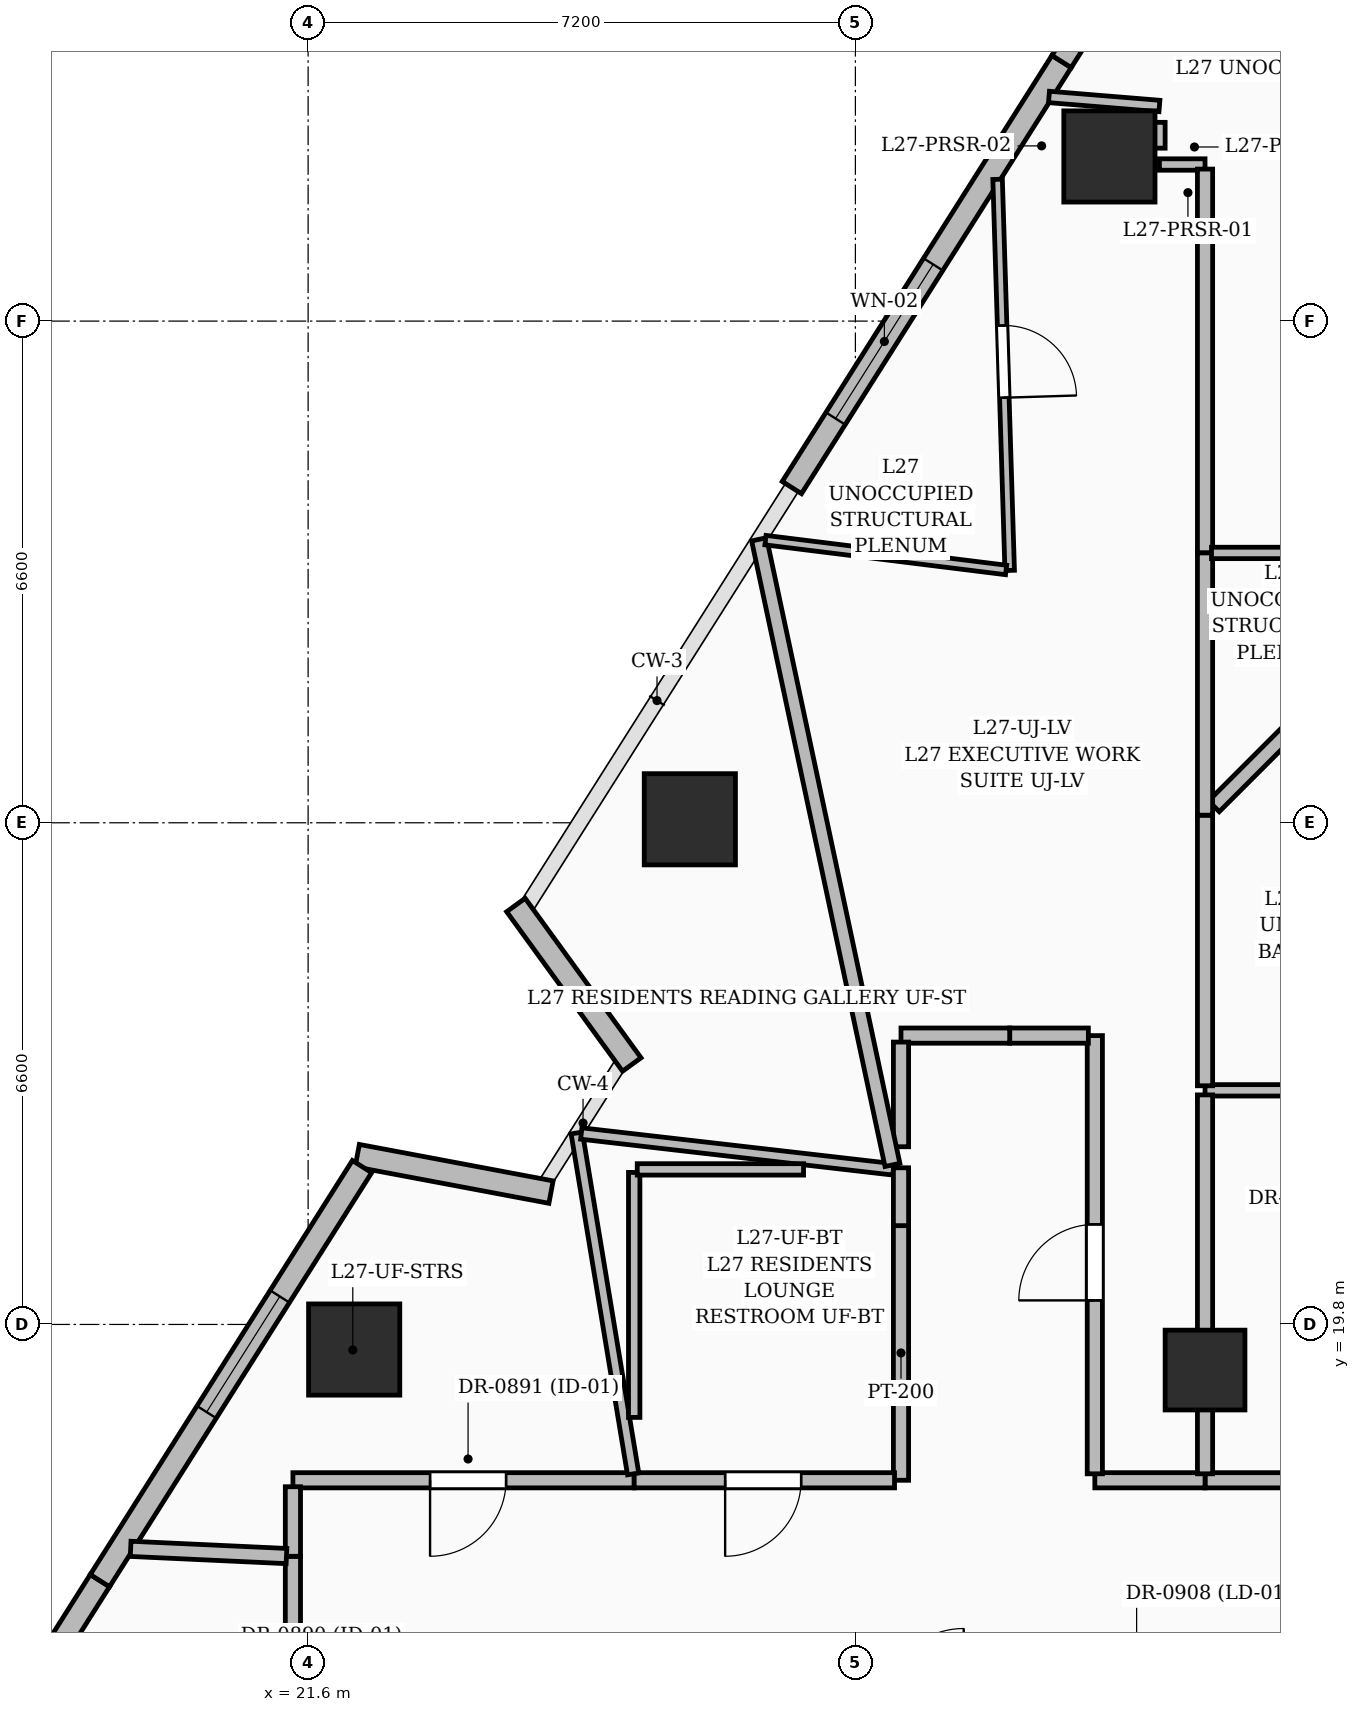
"""IFC4 building model, lengths in metres.
Left out: names, types, materials, properties, quantities, classifications, styles, units other than length and angle.
Written with IfcOpenShell. Run it as: python <this file> out.ifc"""

import sys

from ifc_helpers import new_model, si_unit, direction, frame, frame_2d, origin, origin_2d, place, context, subcontext, project, spatial, rectangle, extrude, element, fill, save


model = new_model("IFC4")
c1 = context("Model", 3, precision=1e-05, world=origin(), true_north=direction((0.0, 1.0)))
c2 = subcontext(c1, "Body", "Model", "MODEL_VIEW")
j1 = project(units=[si_unit("LENGTHUNIT", "METRE"), si_unit("PLANEANGLEUNIT", "RADIAN")], contexts=[c1])
p1 = place(None, origin())
s1 = spatial("IfcSite", under=j1, at=p1, CompositionType="ELEMENT")
p2 = place(p1, origin())
s2 = spatial("IfcBuilding", under=s1, at=p2, CompositionType="ELEMENT")
p3 = place(p2, frame((0.0, 0.0, 110.4)))
s3 = spatial("IfcBuildingStorey", under=s2, at=p3, CompositionType="ELEMENT", Elevation=110.4)
p4 = place(p3, frame((33.4, 19.2, 0.0), z_axis=(0.0, 0.0, 1.0), x_axis=(1.0, 0.0, 0.0)))
e1 = element("IfcColumn", 1, at=p4, inside=s3, PredefinedType="COLUMN", context=c2, shape_type="SweptSolid", body=[
    extrude(rectangle(XDim=1.05, YDim=1.05, at=origin_2d()), origin(), (0.0, 0.0, 1.0), 3.6),
])
for number, where, z_axis, x_axis in (
    (2, (32.142, 35.166, 0.0), (0.0, 0.0, 1.0), (1.0, 0.0, 0.0)),
    (3, (26.622, 26.446, 0.0), (0.0, 0.0, 1.0), (1.0, 0.0, 0.0)),
    (4, (22.206, 19.47, 0.0), (0.0, 0.0, 1.0), (1.0, 0.0, 0.0)),
):
    element("IfcColumn", number, at=place(p3, frame(where, z_axis=z_axis, x_axis=x_axis)), inside=s3, PredefinedType="COLUMN", context=c2, shape_type="SweptSolid", body=[
        extrude(rectangle(XDim=1.2, YDim=1.2, at=origin_2d()), origin(), (0.0, 0.0, 1.0), 3.6),
    ])
for number, where, z_axis, x_axis in (
    (5, (22.246, 22.021, 0.0), (0.0, 0.0, 1.0), (0.983, -0.185, 0.0)),
    (6, (25.858, 23.22, 0.0), (0.0, 0.0, 1.0), (-0.588, 0.809, 0.0)),
):
    element("IfcWall", number, at=place(p3, frame(where, z_axis=z_axis, x_axis=x_axis)), inside=s3, PredefinedType="SOLIDWALL", context=c2, shape_type="SweptSolid", body=[
        extrude(rectangle(XDim=2.594, YDim=0.3, at=frame_2d((1.297, 0.0))), origin(), (0.0, 0.0, 1.0), 2.575),
    ])
p5 = place(p3, frame((27.964, 30.81, 0.0), z_axis=(0.0, 0.0, 1.0), x_axis=(0.534892719091, 0.844919983823, 0.0)))
e7 = element("IfcWall", 7, at=p5, inside=s3, PredefinedType="SOLIDWALL", context=c2, shape_type="SweptSolid", body=[
    extrude(rectangle(XDim=6.634, YDim=0.3, at=frame_2d((3.317, 0.0))), origin(), (0.0, 0.0, 1.0), 3.35),
])
p6 = place(p5, frame((1.075, 0.0, 0.6)))
e8 = element("IfcOpeningElement", 8, at=p6, cuts=e7, PredefinedType="OPENING", context=c2, shape_type="SweptSolid", body=[
    extrude(rectangle(XDim=2.4, YDim=2.1, at=frame_2d((1.2, 1.05))), frame((0.0, 0.16, 0.0), z_axis=(0.0, -1.0, 0.0), x_axis=(1.0, 0.0, 0.0)), (0.0, 0.0, 1.0), 0.32),
])
p7 = place(p3, frame((31.513, 36.415, 0.0), z_axis=(0.0, 0.0, 1.0), x_axis=(0.534892719091, 0.844919983823, 0.0)))
e9 = element("IfcWall", 9, at=p7, inside=s3, PredefinedType="SOLIDWALL", context=c2, shape_type="SweptSolid", body=[
    extrude(rectangle(XDim=6.634, YDim=0.3, at=frame_2d((3.317, 0.0))), origin(), (0.0, 0.0, 1.0), 3.35),
])
p8 = place(p7, frame((0.6, 0.0, 0.55)))
e10 = element("IfcOpeningElement", 10, at=p8, cuts=e9, PredefinedType="OPENING", context=c2, shape_type="SweptSolid", body=[
    extrude(rectangle(XDim=1.6, YDim=2.2, at=frame_2d((0.8, 1.1))), frame((0.0, 0.16, 0.0), z_axis=(0.0, -1.0, 0.0), x_axis=(1.0, 0.0, 0.0)), (0.0, 0.0, 1.0), 0.32),
])
p9 = place(p7, frame((3.35, 0.0, 0.55)))
e11 = element("IfcOpeningElement", 11, at=p9, cuts=e9, PredefinedType="OPENING", context=c2, shape_type="SweptSolid", body=[
    extrude(rectangle(XDim=1.6, YDim=2.2, at=frame_2d((0.8, 1.1))), frame((0.0, 0.16, 0.0), z_axis=(0.0, -1.0, 0.0), x_axis=(1.0, 0.0, 0.0)), (0.0, 0.0, 1.0), 0.32),
])
p10 = place(p3, frame((15.262, 10.746, 0.0), z_axis=(0.0, 0.0, 1.0), x_axis=(0.534880248718, 0.844927878302, 0.0)))
e12 = element("IfcWall", 12, at=p10, inside=s3, PredefinedType="SOLIDWALL", context=c2, shape_type="SweptSolid", body=[
    extrude(rectangle(XDim=6.727, YDim=0.3, at=frame_2d((3.364, 0.0))), origin(), (0.0, 0.0, 1.0), 3.35),
])
p11 = place(p10, frame((0.725, 0.0, 0.55)))
e13 = element("IfcOpeningElement", 13, at=p11, cuts=e12, PredefinedType="OPENING", context=c2, shape_type="SweptSolid", body=[
    extrude(rectangle(XDim=2.1, YDim=2.4, at=frame_2d((1.05, 1.2))), frame((0.0, 0.16, 0.0), z_axis=(0.0, -1.0, 0.0), x_axis=(1.0, 0.0, 0.0)), (0.0, 0.0, 1.0), 0.32),
])
p12 = place(p3, frame((18.861, 16.429, 0.0), z_axis=(0.0, 0.0, 1.0), x_axis=(0.534891708764, 0.844920623429, 0.0)))
e14 = element("IfcWall", 14, at=p12, inside=s3, PredefinedType="SOLIDWALL", context=c2, shape_type="SweptSolid", body=[
    extrude(rectangle(XDim=6.447, YDim=0.3, at=frame_2d((3.224, 0.0))), origin(), (0.0, 0.0, 1.0), 3.35),
])
p13 = place(p12, frame((2.625, 0.0, 0.6)))
e15 = element("IfcOpeningElement", 15, at=p13, cuts=e14, PredefinedType="OPENING", context=c2, shape_type="SweptSolid", body=[
    extrude(rectangle(XDim=1.8, YDim=2.1, at=frame_2d((0.9, 1.05))), frame((0.0, 0.16, 0.0), z_axis=(0.0, -1.0, 0.0), x_axis=(1.0, 0.0, 0.0)), (0.0, 0.0, 1.0), 0.32),
])
p14 = place(p3, frame((21.4, 16.75, 0.0), z_axis=(0.0, 0.0, 1.0), x_axis=(0.0, -1.0, 0.0)))
e16 = element("IfcWall", 16, at=p14, inside=s3, PredefinedType="PARTITIONING", context=c2, shape_type="SweptSolid", body=[
    extrude(rectangle(XDim=4.5, YDim=0.2, at=frame_2d((2.25, 0.0))), origin(), (0.0, 0.0, 1.0), 2.709),
])
p15 = place(p14, frame((1.69, 0.0, 0.0)))
e17 = element("IfcOpeningElement", 17, at=p15, cuts=e16, PredefinedType="OPENING", context=c2, shape_type="SweptSolid", body=[
    extrude(rectangle(XDim=1.0, YDim=2.2, at=frame_2d((0.5, 1.1))), frame((0.0, 0.11, 0.0), z_axis=(0.0, -1.0, 0.0), x_axis=(1.0, 0.0, 0.0)), (0.0, 0.0, 1.0), 0.22),
])
p16 = place(p3, frame((25.89, 17.75, 0.0), z_axis=(0.0, 0.0, 1.0), x_axis=(-1.0, 0.0, 0.0)))
e18 = element("IfcWall", 18, at=p16, inside=s3, PredefinedType="PARTITIONING", context=c2, shape_type="SweptSolid", body=[
    extrude(rectangle(XDim=4.49, YDim=0.2, at=frame_2d((2.245, 0.0))), origin(), (0.0, 0.0, 1.0), 2.372),
])
p17 = place(p16, frame((1.686, 0.0, 0.0)))
e19 = element("IfcOpeningElement", 19, at=p17, cuts=e18, PredefinedType="OPENING", context=c2, shape_type="SweptSolid", body=[
    extrude(rectangle(XDim=1.0, YDim=2.2, at=frame_2d((0.5, 1.1))), frame((0.0, 0.11, 0.0), z_axis=(0.0, -1.0, 0.0), x_axis=(1.0, 0.0, 0.0)), (0.0, 0.0, 1.0), 0.22),
])
p18 = place(p3, frame((21.4, 17.665, 0.0), z_axis=(0.0, 0.0, 1.0), x_axis=(0.0, -1.0, 0.0)))
e20 = element("IfcWall", 20, at=p18, inside=s3, PredefinedType="PARTITIONING", context=c2, shape_type="SweptSolid", body=[
    extrude(rectangle(XDim=0.915, YDim=0.2, at=frame_2d((0.458, 0.0))), origin(), (0.0, 0.0, 1.0), 2.57),
])
p19 = place(p3, frame((29.4, 21.1, 0.0), z_axis=(0.0, 0.0, 1.0), x_axis=(0.0, -1.0, 0.0)))
e21 = element("IfcWall", 21, at=p19, inside=s3, PredefinedType="PARTITIONING", context=c2, shape_type="SweptSolid", body=[
    extrude(rectangle(XDim=3.35, YDim=0.2, at=frame_2d((1.675, 0.0))), origin(), (0.0, 0.0, 1.0), 2.709),
])
p20 = place(p3, frame((29.315, 17.75, 0.0), z_axis=(0.0, 0.0, 1.0), x_axis=(-1.0, 0.0, 0.0)))
e22 = element("IfcWall", 22, at=p20, inside=s3, PredefinedType="PARTITIONING", context=c2, shape_type="SweptSolid", body=[
    extrude(rectangle(XDim=3.425, YDim=0.2, at=frame_2d((1.712, 0.0))), origin(), (0.0, 0.0, 1.0), 2.709),
])
p21 = place(p20, frame((1.229, 0.0, 0.0)))
e23 = element("IfcOpeningElement", 23, at=p21, cuts=e22, PredefinedType="OPENING", context=c2, shape_type="SweptSolid", body=[
    extrude(rectangle(XDim=1.0, YDim=2.2, at=frame_2d((0.5, 1.1))), frame((0.0, 0.11, 0.0), z_axis=(0.0, -1.0, 0.0), x_axis=(1.0, 0.0, 0.0)), (0.0, 0.0, 1.0), 0.22),
])
p22 = place(p3, frame((36.4, 17.75, 0.0), z_axis=(0.0, 0.0, 1.0), x_axis=(-1.0, 0.0, 0.0)))
e24 = element("IfcWall", 24, at=p22, inside=s3, PredefinedType="PARTITIONING", context=c2, shape_type="SweptSolid", body=[
    extrude(rectangle(XDim=3.0, YDim=0.2, at=frame_2d((1.5, 0.0))), origin(), (0.0, 0.0, 1.0), 2.436),
])
p23 = place(p3, frame((33.4, 17.75, 0.0), z_axis=(0.0, 0.0, 1.0), x_axis=(-1.0, 0.0, 0.0)))
e25 = element("IfcWall", 25, at=p23, inside=s3, PredefinedType="PARTITIONING", context=c2, shape_type="SweptSolid", body=[
    extrude(rectangle(XDim=1.45, YDim=0.2, at=frame_2d((0.725, 0.0))), origin(), (0.0, 0.0, 1.0), 3.35),
])
p24 = place(p3, frame((31.95, 17.835, 0.0), z_axis=(0.0, 0.0, 1.0), x_axis=(0.0, 1.0, 0.0)))
e26 = element("IfcWall", 26, at=p24, inside=s3, PredefinedType="PARTITIONING", context=c2, shape_type="SweptSolid", body=[
    extrude(rectangle(XDim=5.765, YDim=0.2, at=frame_2d((2.883, 0.0))), origin(), (0.0, 0.0, 1.0), 2.372),
])
p25 = place(p24, frame((2.281, 0.0, 0.0)))
e27 = element("IfcOpeningElement", 27, at=p25, cuts=e26, PredefinedType="OPENING", context=c2, shape_type="SweptSolid", body=[
    extrude(rectangle(XDim=1.0, YDim=2.2, at=frame_2d((0.5, 1.1))), frame((0.0, 0.11, 0.0), z_axis=(0.0, -1.0, 0.0), x_axis=(1.0, 0.0, 0.0)), (0.0, 0.0, 1.0), 0.22),
])
p26 = place(p3, frame((31.865, 23.6, 0.0), z_axis=(0.0, 0.0, 1.0), x_axis=(-1.0, 0.0, 0.0)))
e28 = element("IfcWall", 28, at=p26, inside=s3, PredefinedType="PARTITIONING", context=c2, shape_type="SweptSolid", body=[
    extrude(rectangle(XDim=1.035, YDim=0.2, at=frame_2d((0.518, 0.0))), origin(), (0.0, 0.0, 1.0), 2.709),
])
p27 = place(p3, frame((30.83, 23.6, 0.0), z_axis=(0.0, 0.0, 1.0), x_axis=(-1.0, 0.0, 0.0)))
e29 = element("IfcWall", 29, at=p27, inside=s3, PredefinedType="PARTITIONING", context=c2, shape_type="SweptSolid", body=[
    extrude(rectangle(XDim=1.43, YDim=0.2, at=frame_2d((0.715, 0.0))), origin(), (0.0, 0.0, 1.0), 2.372),
])
p28 = place(p3, frame((29.4, 23.515, 0.0), z_axis=(0.0, 0.0, 1.0), x_axis=(0.0, -1.0, 0.0)))
e30 = element("IfcWall", 30, at=p28, inside=s3, PredefinedType="PARTITIONING", context=c2, shape_type="SweptSolid", body=[
    extrude(rectangle(XDim=1.377, YDim=0.2, at=frame_2d((0.688, 0.0))), origin(), (0.0, 0.0, 1.0), 2.372),
])
p29 = place(p3, frame((21.315, 16.753, 0.0), z_axis=(0.0, 0.0, 1.0), x_axis=(-0.998928926466, 0.046270939795, 0.0)))
e31 = element("IfcWall", 31, at=p29, inside=s3, PredefinedType="PARTITIONING", context=c2, shape_type="SweptSolid", body=[
    extrude(rectangle(XDim=2.052, YDim=0.2, at=frame_2d((1.026, 0.0))), origin(), (0.0, 0.0, 1.0), 2.57),
])
p30 = place(p3, frame((25.876, 17.834, 0.0), z_axis=(0.0, 0.0, 1.0), x_axis=(-0.163258044995, 0.986583402832, 0.0)))
e32 = element("IfcWall", 32, at=p30, inside=s3, PredefinedType="PARTITIONING", context=c2, shape_type="SweptSolid", body=[
    extrude(rectangle(XDim=4.546, YDim=0.15, at=frame_2d((2.273, 0.0))), origin(), (0.0, 0.0, 1.0), 2.709),
])
p31 = place(p3, frame((29.3, 21.84, 0.0), z_axis=(0.0, 0.0, 1.0), x_axis=(-0.993461085134, 0.114171241234, 0.0)))
e33 = element("IfcWall", 33, at=p31, inside=s3, PredefinedType="PARTITIONING", context=c2, shape_type="SweptSolid", body=[
    extrude(rectangle(XDim=4.134, YDim=0.15, at=frame_2d((2.067, 0.0))), origin(), (0.0, 0.0, 1.0), 2.709),
])
p32 = place(p3, frame((29.288, 21.899, 0.0), z_axis=(0.0, 0.0, 1.0), x_axis=(-0.208508604507, 0.978020532426, 0.0)))
e34 = element("IfcWall", 34, at=p32, inside=s3, PredefinedType="PARTITIONING", context=c2, shape_type="SweptSolid", body=[
    extrude(rectangle(XDim=8.415, YDim=0.2, at=frame_2d((4.208, 0.0))), origin(), (0.0, 0.0, 1.0), 2.372),
])
p33 = place(p3, frame((33.4, 22.88, 0.0), z_axis=(0.0, 0.0, 1.0), x_axis=(1.0, 0.0, 0.0)))
e35 = element("IfcWall", 35, at=p33, inside=s3, PredefinedType="PARTITIONING", context=c2, shape_type="SweptSolid", body=[
    extrude(rectangle(XDim=2.94, YDim=0.15, at=frame_2d((1.47, 0.0))), origin(), (0.0, 0.0, 1.0), 2.436),
])
p34 = place(p33, frame((1.075, 0.0, 0.0)))
e36 = element("IfcOpeningElement", 36, at=p34, cuts=e35, PredefinedType="OPENING", context=c2, shape_type="SweptSolid", body=[
    extrude(rectangle(XDim=0.85, YDim=2.1, at=frame_2d((0.425, 1.05))), frame((0.0, 0.085, 0.0), z_axis=(0.0, -1.0, 0.0), x_axis=(1.0, 0.0, 0.0)), (0.0, 0.0, 1.0), 0.17),
])
p35 = place(p3, frame((33.4, 26.5, 0.0), z_axis=(0.0, 0.0, 1.0), x_axis=(0.0, -1.0, 0.0)))
e37 = element("IfcWall", 37, at=p35, inside=s3, PredefinedType="PARTITIONING", context=c2, shape_type="SweptSolid", body=[
    extrude(rectangle(XDim=3.56, YDim=0.2, at=frame_2d((1.78, 0.0))), origin(), (0.0, 0.0, 1.0), 2.709),
])
p36 = place(p3, frame((36.358, 29.458, 0.0), z_axis=(0.0, 0.0, 1.0), x_axis=(-0.707137163672, -0.707076397395, 0.0)))
e38 = element("IfcWall", 38, at=p36, inside=s3, PredefinedType="PARTITIONING", context=c2, shape_type="SweptSolid", body=[
    extrude(rectangle(XDim=4.018, YDim=0.2, at=frame_2d((2.009, 0.0))), origin(), (0.0, 0.0, 1.0), 2.372),
])
p37 = place(p3, frame((33.4, 22.82, 0.0), z_axis=(0.0, 0.0, 1.0), x_axis=(0.0, -1.0, 0.0)))
e39 = element("IfcWall", 39, at=p37, inside=s3, PredefinedType="PARTITIONING", context=c2, shape_type="SweptSolid", body=[
    extrude(rectangle(XDim=4.985, YDim=0.2, at=frame_2d((2.493, 0.0))), origin(), (0.0, 0.0, 1.0), 2.436),
])
p38 = place(p3, frame((33.4, 35.06, 0.0), z_axis=(0.0, 0.0, 1.0), x_axis=(-1.0, 0.0, 0.0)))
e40 = element("IfcWall", 40, at=p38, inside=s3, PredefinedType="PARTITIONING", context=c2, shape_type="SweptSolid", body=[
    extrude(rectangle(XDim=0.6, YDim=0.15, at=frame_2d((0.3, 0.0))), origin(), (0.0, 0.0, 1.0), 2.57),
])
p39 = place(p3, frame((30.671, 34.865, 0.0), z_axis=(0.0, 0.0, 1.0), x_axis=(0.030923800782, -0.999521744909, 0.0)))
e41 = element("IfcWall", 41, at=p39, inside=s3, PredefinedType="PARTITIONING", context=c2, shape_type="SweptSolid", body=[
    extrude(rectangle(XDim=5.147, YDim=0.125, at=frame_2d((2.574, 0.0))), origin(), (0.0, 0.0, 1.0), 2.57),
])
p40 = place(p39, frame((1.924, 0.0, 0.0)))
e42 = element("IfcOpeningElement", 42, at=p40, cuts=e41, PredefinedType="OPENING", context=c2, shape_type="SweptSolid", body=[
    extrude(rectangle(XDim=0.95, YDim=2.2, at=frame_2d((0.475, 1.1))), frame((0.0, 0.072, 0.0), z_axis=(0.0, -1.0, 0.0), x_axis=(1.0, 0.0, 0.0)), (0.0, 0.0, 1.0), 0.145),
])
p41 = place(p3, frame((33.4, 29.95, 0.0), z_axis=(0.0, 0.0, 1.0), x_axis=(0.0, 1.0, 0.0)))
e43 = element("IfcWall", 43, at=p41, inside=s3, PredefinedType="PARTITIONING", context=c2, shape_type="SweptSolid", body=[
    extrude(rectangle(XDim=5.05, YDim=0.2, at=frame_2d((2.525, 0.0))), origin(), (0.0, 0.0, 1.0), 2.372),
])
p42 = place(p3, frame((33.4, 26.5, 0.0), z_axis=(0.0, 0.0, 1.0), x_axis=(0.0, 1.0, 0.0)))
e44 = element("IfcWall", 44, at=p42, inside=s3, PredefinedType="PARTITIONING", context=c2, shape_type="SweptSolid", body=[
    extrude(rectangle(XDim=3.45, YDim=0.2, at=frame_2d((1.725, 0.0))), origin(), (0.0, 0.0, 1.0), 2.709),
])
p43 = place(p3, frame((27.617, 30.118, 0.0), z_axis=(0.0, 0.0, 1.0), x_axis=(0.992397517991, -0.123073824536, 0.0)))
e45 = element("IfcWall", 45, at=p43, inside=s3, PredefinedType="PARTITIONING", context=c2, shape_type="SweptSolid", body=[
    extrude(rectangle(XDim=3.19, YDim=0.125, at=frame_2d((1.595, 0.0))), origin(), (0.0, 0.0, 1.0), 2.57),
])
p44 = place(p3, frame((33.485, 29.95, 0.0), z_axis=(0.0, 0.0, 1.0), x_axis=(1.0, 0.0, 0.0)))
e46 = element("IfcWall", 46, at=p44, inside=s3, PredefinedType="PARTITIONING", context=c2, shape_type="SweptSolid", body=[
    extrude(rectangle(XDim=3.28, YDim=0.15, at=frame_2d((1.64, 0.0))), origin(), (0.0, 0.0, 1.0), 2.372),
])
p45 = place(p3, frame((25.89, 18.577, 0.0), z_axis=(0.0, 0.0, 1.0), x_axis=(0.0, 1.0, 0.0)))
e47 = element("IfcWall", 47, at=p45, inside=s3, PredefinedType="PARTITIONING", context=c2, shape_type="SweptSolid", body=[
    extrude(rectangle(XDim=3.223, YDim=0.15, at=frame_2d((1.612, 0.0))), origin(), (0.0, 0.0, 1.0), 2.709),
])
p46 = place(p3, frame((25.93, 21.84, 0.0), z_axis=(0.0, 0.0, 1.0), x_axis=(1.0, 0.0, 0.0)))
e48 = element("IfcWall", 48, at=p46, inside=s3, PredefinedType="PARTITIONING", context=c2, shape_type="SweptSolid", body=[
    extrude(rectangle(XDim=2.188, YDim=0.15, at=frame_2d((1.094, 0.0))), origin(), (0.0, 0.0, 1.0), 2.709),
])
p47 = place(p3, frame((31.347, 35.949, 0.0), z_axis=(0.0, 0.0, 1.0), x_axis=(0.996669356606, -0.081548719198, 0.0)))
e49 = element("IfcWall", 49, at=p47, inside=s3, PredefinedType="PARTITIONING", context=c2, shape_type="SweptSolid", body=[
    extrude(rectangle(XDim=1.458, YDim=0.15, at=frame_2d((0.729, 0.0))), origin(), (0.0, 0.0, 1.0), 3.35),
])
p48 = place(p3, frame((32.8, 35.615, 0.0), z_axis=(0.0, 0.0, 1.0), x_axis=(0.0, -1.0, 0.0)))
e50 = element("IfcWall", 50, at=p48, inside=s3, PredefinedType="PARTITIONING", context=c2, shape_type="SweptSolid", body=[
    extrude(rectangle(XDim=0.34, YDim=0.15, at=frame_2d((0.17, 0.0))), origin(), (0.0, 0.0, 1.0), 2.57),
])
p49 = place(p3, frame((29.4, 21.861, 0.0), z_axis=(0.0, 0.0, 1.0), x_axis=(0.0, -1.0, 0.0)))
e51 = element("IfcWall", 51, at=p49, inside=s3, PredefinedType="PARTITIONING", context=c2, shape_type="SweptSolid", body=[
    extrude(rectangle(XDim=0.761, YDim=0.2, at=frame_2d((0.38, 0.0))), origin(), (0.0, 0.0, 1.0), 2.372),
])
p50 = place(p6, origin())
e52 = element("IfcWindow", 52, at=p50, inside=s3, PartitioningType="SINGLE_PANEL", PredefinedType="WINDOW", context=c2, shape_type="SweptSolid", body=[
    extrude(rectangle(XDim=2.4, YDim=2.1, at=frame_2d((1.2, 1.05))), frame((0.0, 0.03, 0.0), z_axis=(0.0, -1.0, 0.0), x_axis=(1.0, 0.0, 0.0)), (0.0, 0.0, 1.0), 0.06),
])
fill(e8, e52)
p51 = place(p13, origin())
e53 = element("IfcWindow", 53, at=p51, inside=s3, PartitioningType="SINGLE_PANEL", PredefinedType="WINDOW", context=c2, shape_type="SweptSolid", body=[
    extrude(rectangle(XDim=1.8, YDim=2.1, at=frame_2d((0.9, 1.05))), frame((0.0, 0.03, 0.0), z_axis=(0.0, -1.0, 0.0), x_axis=(1.0, 0.0, 0.0)), (0.0, 0.0, 1.0), 0.06),
])
fill(e15, e53)
p52 = place(p17, origin())
e54 = element("IfcDoor", 54, at=p52, inside=s3, OperationType="SINGLE_SWING_RIGHT", PredefinedType="DOOR", context=c2, shape_type="SweptSolid", body=[
    extrude(rectangle(XDim=1.0, YDim=2.2, at=frame_2d((0.5, 1.1))), frame((0.0, 0.025, 0.0), z_axis=(0.0, -1.0, 0.0), x_axis=(1.0, 0.0, 0.0)), (0.0, 0.0, 1.0), 0.05),
])
fill(e19, e54)
p53 = place(p25, origin())
e55 = element("IfcDoor", 55, at=p53, inside=s3, OperationType="SINGLE_SWING_LEFT", PredefinedType="DOOR", context=c2, shape_type="SweptSolid", body=[
    extrude(rectangle(XDim=1.0, YDim=2.2, at=frame_2d((0.5, 1.1))), frame((0.0, 0.025, 0.0), z_axis=(0.0, -1.0, 0.0), x_axis=(1.0, 0.0, 0.0)), (0.0, 0.0, 1.0), 0.05),
])
fill(e27, e55)
p54 = place(p40, origin())
e56 = element("IfcDoor", 56, at=p54, inside=s3, OperationType="SINGLE_SWING_RIGHT", PredefinedType="DOOR", context=c2, shape_type="SweptSolid", body=[
    extrude(rectangle(XDim=0.95, YDim=2.2, at=frame_2d((0.475, 1.1))), frame((0.0, 0.025, 0.0), z_axis=(0.0, -1.0, 0.0), x_axis=(1.0, 0.0, 0.0)), (0.0, 0.0, 1.0), 0.05),
])
fill(e42, e56)
p55 = place(p21, origin())
e57 = element("IfcDoor", 57, at=p55, inside=s3, OperationType="SINGLE_SWING_RIGHT", PredefinedType="DOOR", context=c2, shape_type="SweptSolid", body=[
    extrude(rectangle(XDim=1.0, YDim=2.2, at=frame_2d((0.5, 1.1))), frame((0.0, 0.025, 0.0), z_axis=(0.0, -1.0, 0.0), x_axis=(1.0, 0.0, 0.0)), (0.0, 0.0, 1.0), 0.05),
])
fill(e23, e57)
save(model, sys.argv[1])
